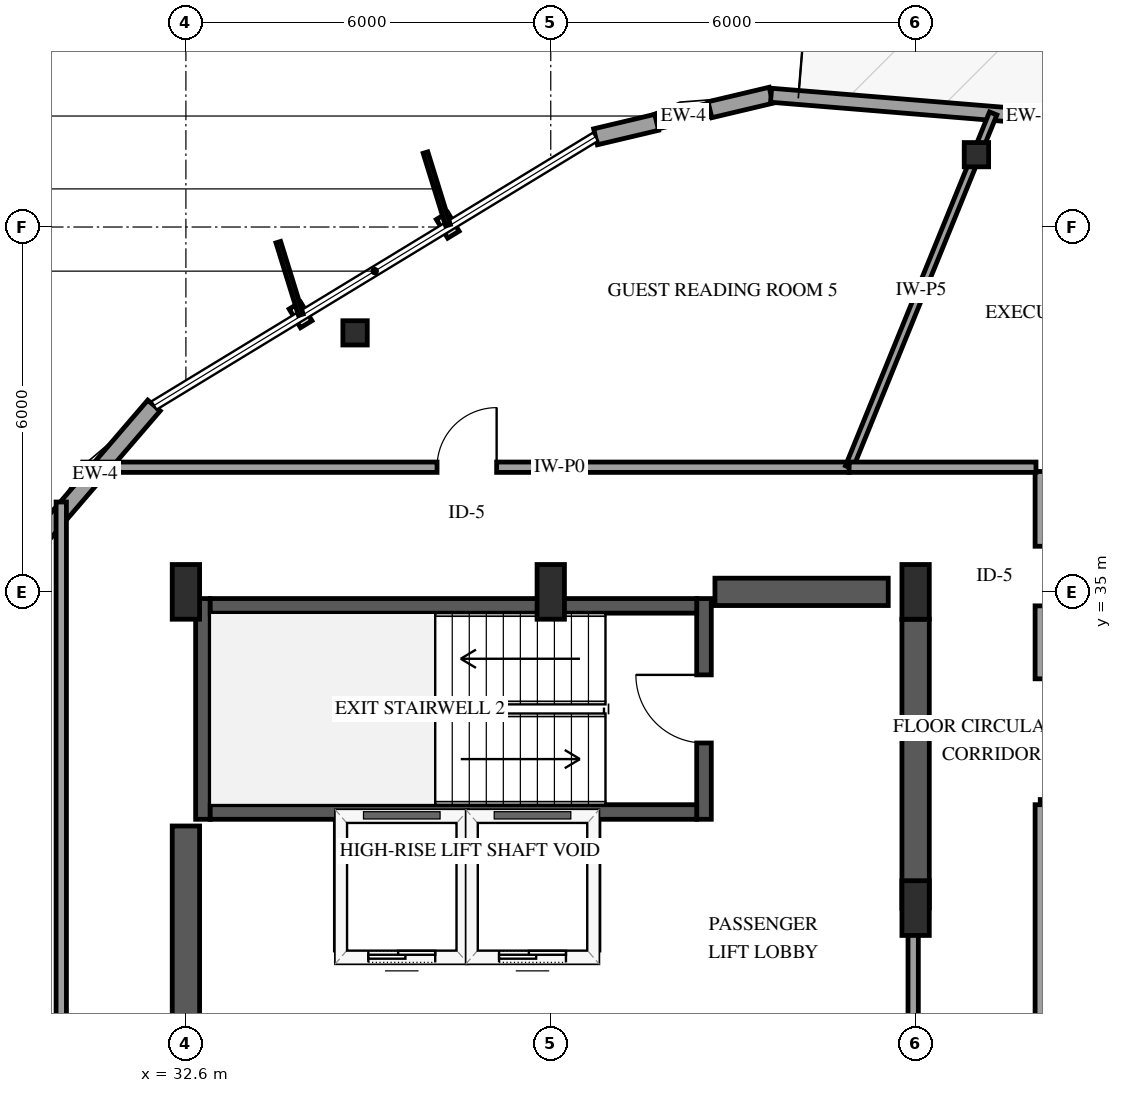
"""IFC4 building model, lengths in metres.
Left out: names, types, materials, properties, quantities, classifications, styles, units other than length and angle.
Written with IfcOpenShell. Run it as: python <this file> out.ifc"""

import sys

from ifc_helpers import new_model, si_unit, direction, frame, frame_2d, origin, origin_2d, place, context, subcontext, project, spatial, rectangle, i_section, extrude, element, fill, save


model = new_model("IFC4")
c1 = context("Model", 3, precision=1e-05, world=origin(), true_north=direction((0.0, 1.0)))
c2 = subcontext(c1, "Body", "Model", "MODEL_VIEW")
j1 = project(units=[si_unit("LENGTHUNIT", "METRE"), si_unit("PLANEANGLEUNIT", "RADIAN")], contexts=[c1])
p1 = place(None, origin())
s1 = spatial("IfcSite", under=j1, at=p1, CompositionType="ELEMENT")
p2 = place(p1, origin())
s2 = spatial("IfcBuilding", under=s1, at=p2, CompositionType="ELEMENT")
p3 = place(p2, frame((0.0, 0.0, 280.0)))
s3 = spatial("IfcBuildingStorey", under=s2, at=p3, CompositionType="ELEMENT", Elevation=280.0)
p4 = place(p3, frame((32.88, 31.26, 0.0), z_axis=(0.0, 0.0, 1.0), x_axis=(0.0, 1.0, 0.0)))
e1 = element("IfcWall", 1, at=p4, inside=s3, PredefinedType="SHEAR", context=c2, shape_type="SweptSolid", body=[
    extrude(rectangle(XDim=3.63, YDim=0.24, at=frame_2d((1.815, 0.0))), origin(), (0.0, 0.0, 1.0), 3.75),
])
p5 = place(p3, frame((41.12, 31.26, 0.0), z_axis=(0.0, 0.0, 1.0), x_axis=(0.0, 1.0, 0.0)))
e2 = element("IfcWall", 2, at=p5, inside=s3, PredefinedType="SHEAR", context=c2, shape_type="SweptSolid", body=[
    extrude(rectangle(XDim=3.63, YDim=0.24, at=frame_2d((1.815, 0.0))), origin(), (0.0, 0.0, 1.0), 3.75),
])
p6 = place(p5, frame((1.255, 0.0, 0.0)))
e3 = element("IfcOpeningElement", 3, at=p6, cuts=e2, PredefinedType="OPENING", context=c2, shape_type="SweptSolid", body=[
    extrude(rectangle(XDim=1.12, YDim=2.15, at=frame_2d((0.56, 1.075))), frame((0.0, 0.13, 0.0), z_axis=(0.0, -1.0, 0.0), x_axis=(1.0, 0.0, 0.0)), (0.0, 0.0, 1.0), 0.26),
])
for number, where, z_axis, x_axis in (
    (4, (33.0, 31.38, 0.0), (0.0, 0.0, 1.0), (1.0, 0.0, 0.0)),
    (5, (33.0, 34.77, 0.0), (0.0, 0.0, 1.0), (1.0, 0.0, 0.0)),
):
    element("IfcWall", number, at=place(p3, frame(where, z_axis=z_axis, x_axis=x_axis)), inside=s3, PredefinedType="SHEAR", context=c2, shape_type="SweptSolid", body=[
        extrude(rectangle(XDim=8.0, YDim=0.24, at=frame_2d((4.0, 0.0))), origin(), (0.0, 0.0, 1.0), 3.75),
    ])
p7 = place(p3, frame((32.6, 18.85, 0.0), z_axis=(0.0, 0.0, 1.0), x_axis=(0.0, 1.0, 0.0)))
e6 = element("IfcWall", 6, at=p7, inside=s3, PredefinedType="SHEAR", context=c2, shape_type="SweptSolid", body=[
    extrude(rectangle(XDim=12.3, YDim=0.45, at=frame_2d((6.15, 0.0))), origin(), (0.0, 0.0, 1.0), 3.75),
])
p8 = place(p3, frame((41.3, 35.0, 0.0), z_axis=(0.0, 0.0, 1.0), x_axis=(1.0, 0.0, 0.0)))
e7 = element("IfcWall", 7, at=p8, inside=s3, PredefinedType="SHEAR", context=c2, shape_type="SweptSolid", body=[
    extrude(rectangle(XDim=2.85, YDim=0.45, at=frame_2d((1.425, 0.0))), origin(), (0.0, 0.0, 1.0), 3.75),
])
p9 = place(p3, frame((44.6, 29.8, 0.0), z_axis=(0.0, 0.0, 1.0), x_axis=(0.0, 1.0, 0.0)))
e8 = element("IfcWall", 8, at=p9, inside=s3, PredefinedType="SHEAR", context=c2, shape_type="SweptSolid", body=[
    extrude(rectangle(XDim=4.75, YDim=0.45, at=frame_2d((2.375, 0.0))), origin(), (0.0, 0.0, 1.0), 3.75),
])
for number, where, z_axis, x_axis in (
    (9, (32.6, 35.0, 0.0), (0.0, 0.0, 1.0), (1.0, 0.0, 0.0)),
    (10, (38.6, 35.0, 0.0), (0.0, 0.0, 1.0), (1.0, 0.0, 0.0)),
    (11, (44.6, 29.8, 0.0), (0.0, 0.0, 1.0), (1.0, 0.0, 0.0)),
    (12, (44.6, 35.0, 0.0), (0.0, 0.0, 1.0), (1.0, 0.0, 0.0)),
):
    element("IfcColumn", number, at=place(p3, frame(where, z_axis=z_axis, x_axis=x_axis)), inside=s3, PredefinedType="PILASTER", context=c2, shape_type="SweptSolid", body=[
        extrude(rectangle(XDim=0.45, YDim=0.9, at=origin_2d()), origin(), (0.0, 0.0, 1.0), 3.75),
    ])
for number, where, z_axis, x_axis in (
    (13, (45.6, 42.189, 0.0), (0.0, 0.0, 1.0), (1.0, 0.0, 0.0)),
    (14, (35.382, 39.26, 0.0), (0.0, 0.0, 1.0), (1.0, 0.0, 0.0)),
):
    element("IfcColumn", number, at=place(p3, frame(where, z_axis=z_axis, x_axis=x_axis)), inside=s3, PredefinedType="COLUMN", context=c2, shape_type="SweptSolid", body=[
        extrude(i_section(OverallWidth=0.401, OverallDepth=0.399, WebThickness=0.025, FlangeThickness=0.04, FilletRadius=0.038, at=origin_2d()), origin(), (0.0, 0.0, 1.0), 3.75),
    ])
p10 = place(p3, frame((42.223, 43.167, 0.0), z_axis=(0.0, 0.0, 1.0), x_axis=(-0.973092427452, -0.230415120242, 0.0)))
e15 = element("IfcWall", 15, at=p10, inside=s3, PredefinedType="SOLIDWALL", context=c2, shape_type="SweptSolid", body=[
    extrude(rectangle(XDim=2.967, YDim=0.27, at=frame_2d((1.483, 0.0))), origin(), (0.0, 0.0, 1.0), 2.789),
])
p11 = place(p10, frame((1.033, 0.0, 0.75)))
e16 = element("IfcOpeningElement", 16, at=p11, cuts=e15, PredefinedType="OPENING", context=c2, shape_type="SweptSolid", body=[
    extrude(rectangle(XDim=0.9, YDim=1.5, at=frame_2d((0.45, 0.75))), frame((0.0, 0.145, 0.0), z_axis=(0.0, -1.0, 0.0), x_axis=(1.0, 0.0, 0.0)), (0.0, 0.0, 1.0), 0.29),
])
p12 = place(p3, frame((50.695, 42.473, 0.0), z_axis=(0.0, 0.0, 1.0), x_axis=(-0.996664954759, 0.081602499682, 0.0)))
e17 = element("IfcWall", 17, at=p12, inside=s3, PredefinedType="SOLIDWALL", context=c2, shape_type="SweptSolid", body=[
    extrude(rectangle(XDim=8.5, YDim=0.23, at=frame_2d((4.25, 0.0))), origin(), (0.0, 0.0, 1.0), 2.789),
])
p13 = place(p12, frame((0.65, 0.0, 0.0)))
e18 = element("IfcOpeningElement", 18, at=p13, cuts=e17, PredefinedType="OPENING", context=c2, shape_type="SweptSolid", body=[
    extrude(rectangle(XDim=1.0, YDim=2.15, at=frame_2d((0.5, 1.075))), frame((0.0, 0.125, 0.0), z_axis=(0.0, -1.0, 0.0), x_axis=(1.0, 0.0, 0.0)), (0.0, 0.0, 1.0), 0.25),
])
p14 = place(p12, frame((2.29, 0.0, 0.72)))
e19 = element("IfcOpeningElement", 19, at=p14, cuts=e17, PredefinedType="OPENING", context=c2, shape_type="SweptSolid", body=[
    extrude(rectangle(XDim=0.9, YDim=1.5, at=frame_2d((0.45, 0.75))), frame((0.0, 0.125, 0.0), z_axis=(0.0, -1.0, 0.0), x_axis=(1.0, 0.0, 0.0)), (0.0, 0.0, 1.0), 0.25),
])
p15 = place(p3, frame((32.075, 38.065, 0.0), z_axis=(0.0, 0.0, 1.0), x_axis=(-0.651854753915, -0.758343840087, 0.0)))
e20 = element("IfcWall", 20, at=p15, inside=s3, PredefinedType="SOLIDWALL", context=c2, shape_type="SweptSolid", body=[
    extrude(rectangle(XDim=2.967, YDim=0.27, at=frame_2d((1.483, 0.0))), origin(), (0.0, 0.0, 1.0), 2.789),
])
p16 = place(p3, frame((35.15, 29.0, 0.0), z_axis=(0.0, 0.0, 1.0), x_axis=(1.0, 0.0, 0.0)))
e21 = element("IfcWall", 21, at=p16, inside=s3, PredefinedType="SOLIDWALL", context=c2, shape_type="SweptSolid", body=[
    extrude(rectangle(XDim=2.0, YDim=0.185, at=frame_2d((1.0, 0.0))), origin(), (0.0, 0.0, 1.0), 3.41),
])
p17 = place(p16, frame((0.45, 0.0, 0.0)))
e22 = element("IfcOpeningElement", 22, at=p17, cuts=e21, PredefinedType="OPENING", context=c2, shape_type="SweptSolid", body=[
    extrude(rectangle(XDim=1.1, YDim=2.15, at=frame_2d((0.55, 1.075))), frame((0.0, 0.103, 0.0), z_axis=(0.0, -1.0, 0.0), x_axis=(1.0, 0.0, 0.0)), (0.0, 0.0, 1.0), 0.205),
])
for number, where, z_axis, x_axis in (
    (23, (35.15, 29.11, 0.0), (0.0, 0.0, 1.0), (0.0, 1.0, 0.0)),
    (24, (37.15, 29.11, 0.0), (0.0, 0.0, 1.0), (0.0, 1.0, 0.0)),
):
    element("IfcWall", number, at=place(p3, frame(where, z_axis=z_axis, x_axis=x_axis)), inside=s3, PredefinedType="SOLIDWALL", context=c2, shape_type="SweptSolid", body=[
        extrude(rectangle(XDim=2.1, YDim=0.185, at=frame_2d((1.05, 0.0))), origin(), (0.0, 0.0, 1.0), 3.41),
    ])
p18 = place(p3, frame((37.3, 29.0, 0.0), z_axis=(0.0, 0.0, 1.0), x_axis=(1.0, 0.0, 0.0)))
e25 = element("IfcWall", 25, at=p18, inside=s3, PredefinedType="SOLIDWALL", context=c2, shape_type="SweptSolid", body=[
    extrude(rectangle(XDim=2.0, YDim=0.185, at=frame_2d((1.0, 0.0))), origin(), (0.0, 0.0, 1.0), 3.41),
])
p19 = place(p18, frame((0.45, 0.0, 0.0)))
e26 = element("IfcOpeningElement", 26, at=p19, cuts=e25, PredefinedType="OPENING", context=c2, shape_type="SweptSolid", body=[
    extrude(rectangle(XDim=1.1, YDim=2.15, at=frame_2d((0.55, 1.075))), frame((0.0, 0.103, 0.0), z_axis=(0.0, -1.0, 0.0), x_axis=(1.0, 0.0, 0.0)), (0.0, 0.0, 1.0), 0.205),
])
p20 = place(p3, frame((39.3, 29.11, 0.0), z_axis=(0.0, 0.0, 1.0), x_axis=(0.0, 1.0, 0.0)))
e27 = element("IfcWall", 27, at=p20, inside=s3, PredefinedType="SOLIDWALL", context=c2, shape_type="SweptSolid", body=[
    extrude(rectangle(XDim=2.1, YDim=0.185, at=frame_2d((1.05, 0.0))), origin(), (0.0, 0.0, 1.0), 3.41),
])
p21 = place(p3, frame((30.55, 13.843, 0.0), z_axis=(0.0, 0.0, 1.0), x_axis=(0.0, 1.0, 0.0)))
e28 = element("IfcWall", 28, at=p21, inside=s3, PredefinedType="PARTITIONING", context=c2, shape_type="SweptSolid", body=[
    extrude(rectangle(XDim=22.635, YDim=0.17, at=frame_2d((11.317, 0.0))), origin(), (0.0, 0.0, 1.0), 3.41),
])
p22 = place(p21, frame((10.843, 0.0, 0.0)))
e29 = element("IfcOpeningElement", 29, at=p22, cuts=e28, PredefinedType="OPENING", context=c2, shape_type="SweptSolid", body=[
    extrude(rectangle(XDim=0.98, YDim=2.15, at=frame_2d((0.49, 1.075))), frame((0.0, 0.095, 0.0), z_axis=(0.0, -1.0, 0.0), x_axis=(1.0, 0.0, 0.0)), (0.0, 0.0, 1.0), 0.19),
])
p23 = place(p3, frame((46.65, 26.665, 0.0), z_axis=(0.0, 0.0, 1.0), x_axis=(0.97930966803, 0.202367423521, 0.0)))
e30 = element("IfcWall", 30, at=p23, inside=s3, PredefinedType="PARTITIONING", context=c2, shape_type="SweptSolid", body=[
    extrude(rectangle(XDim=15.897, YDim=0.13, at=frame_2d((7.948, 0.0))), origin(), (0.0, 0.0, 1.0), 2.705),
])
p24 = place(p3, frame((61.835, 31.5, 0.0), z_axis=(0.0, 0.0, 1.0), x_axis=(-1.0, 0.0, 0.0)))
e31 = element("IfcWall", 31, at=p24, inside=s3, PredefinedType="PARTITIONING", context=c2, shape_type="SweptSolid", body=[
    extrude(rectangle(XDim=15.185, YDim=0.17, at=frame_2d((7.593, 0.0))), origin(), (0.0, 0.0, 1.0), 3.41),
])
p25 = place(p24, frame((7.118, 0.0, 0.0)))
e32 = element("IfcOpeningElement", 32, at=p25, cuts=e31, PredefinedType="OPENING", context=c2, shape_type="SweptSolid", body=[
    extrude(rectangle(XDim=0.98, YDim=2.15, at=frame_2d((0.49, 1.075))), frame((0.0, 0.095, 0.0), z_axis=(0.0, -1.0, 0.0), x_axis=(1.0, 0.0, 0.0)), (0.0, 0.0, 1.0), 0.19),
])
p26 = place(p3, frame((30.903, 37.05, 0.0), z_axis=(0.0, 0.0, 1.0), x_axis=(1.0, 0.0, 0.0)))
e33 = element("IfcWall", 33, at=p26, inside=s3, PredefinedType="PARTITIONING", context=c2, shape_type="SweptSolid", body=[
    extrude(rectangle(XDim=12.604, YDim=0.17, at=frame_2d((6.302, 0.0))), origin(), (0.0, 0.0, 1.0), 3.41),
])
p27 = place(p26, frame((5.827, 0.0, 0.0)))
e34 = element("IfcOpeningElement", 34, at=p27, cuts=e33, PredefinedType="OPENING", context=c2, shape_type="SweptSolid", body=[
    extrude(rectangle(XDim=0.98, YDim=2.15, at=frame_2d((0.49, 1.075))), frame((0.0, 0.095, 0.0), z_axis=(0.0, -1.0, 0.0), x_axis=(1.0, 0.0, 0.0)), (0.0, 0.0, 1.0), 0.19),
])
p28 = place(p3, frame((44.56, 29.8, 0.0), z_axis=(0.0, 0.0, 1.0), x_axis=(0.0, -1.0, 0.0)))
e35 = element("IfcWall", 35, at=p28, inside=s3, PredefinedType="PARTITIONING", context=c2, shape_type="SweptSolid", body=[
    extrude(rectangle(XDim=6.91, YDim=0.17, at=frame_2d((3.455, 0.0))), origin(), (0.0, 0.0, 1.0), 2.45),
])
p29 = place(p28, frame((2.915, 0.0, 0.0)))
e36 = element("IfcOpeningElement", 36, at=p29, cuts=e35, PredefinedType="OPENING", context=c2, shape_type="SweptSolid", body=[
    extrude(rectangle(XDim=1.08, YDim=2.15, at=frame_2d((0.54, 1.075))), frame((0.0, 0.095, 0.0), z_axis=(0.0, -1.0, 0.0), x_axis=(1.0, 0.0, 0.0)), (0.0, 0.0, 1.0), 0.19),
])
p30 = place(p3, frame((43.507, 37.05, 0.0), z_axis=(0.0, 0.0, 1.0), x_axis=(0.377112931265, 0.926167283525, 0.0)))
e37 = element("IfcWall", 37, at=p30, inside=s3, PredefinedType="PARTITIONING", context=c2, shape_type="SweptSolid", body=[
    extrude(rectangle(XDim=6.282, YDim=0.13, at=frame_2d((3.141, 0.0))), origin(), (0.0, 0.0, 1.0), 2.705),
])
p31 = place(p3, frame((46.65, 31.5, 0.0), z_axis=(0.0, 0.0, 1.0), x_axis=(0.0, -1.0, 0.0)))
e38 = element("IfcWall", 38, at=p31, inside=s3, PredefinedType="PARTITIONING", context=c2, shape_type="SweptSolid", body=[
    extrude(rectangle(XDim=4.835, YDim=0.17, at=frame_2d((2.417, 0.0))), origin(), (0.0, 0.0, 1.0), 3.41),
])
p32 = place(p3, frame((46.65, 36.98, 0.0), z_axis=(0.0, 0.0, 1.0), x_axis=(0.0, -1.0, 0.0)))
e39 = element("IfcWall", 39, at=p32, inside=s3, PredefinedType="PARTITIONING", context=c2, shape_type="SweptSolid", body=[
    extrude(rectangle(XDim=3.41, YDim=0.17, at=frame_2d((1.705, 0.0))), origin(), (0.0, 0.0, 1.0), 3.41),
])
p33 = place(p32, frame((1.23, 0.0, 0.0)))
e40 = element("IfcOpeningElement", 40, at=p33, cuts=e39, PredefinedType="OPENING", context=c2, shape_type="SweptSolid", body=[
    extrude(rectangle(XDim=0.98, YDim=2.15, at=frame_2d((0.49, 1.075))), frame((0.0, 0.095, 0.0), z_axis=(0.0, -1.0, 0.0), x_axis=(1.0, 0.0, 0.0)), (0.0, 0.0, 1.0), 0.19),
])
p34 = place(p3, frame((43.507, 37.05, 0.0), z_axis=(0.0, 0.0, 1.0), x_axis=(1.0, 0.0, 0.0)))
e41 = element("IfcWall", 41, at=p34, inside=s3, PredefinedType="PARTITIONING", context=c2, shape_type="SweptSolid", body=[
    extrude(rectangle(XDim=3.073, YDim=0.17, at=frame_2d((1.537, 0.0))), origin(), (0.0, 0.0, 1.0), 3.41),
])
p35 = place(p11, origin())
e42 = element("IfcWindow", 42, at=p35, inside=s3, PartitioningType="SINGLE_PANEL", PredefinedType="WINDOW", context=c2, shape_type="SweptSolid", body=[
    extrude(rectangle(XDim=0.9, YDim=1.5, at=frame_2d((0.45, 0.75))), frame((0.0, 0.03, 0.0), z_axis=(0.0, -1.0, 0.0), x_axis=(1.0, 0.0, 0.0)), (0.0, 0.0, 1.0), 0.06),
])
fill(e16, e42)
p36 = place(p17, origin())
e43 = element("IfcDoor", 43, at=p36, inside=s3, OperationType="SLIDING_TO_LEFT", PredefinedType="DOOR", context=c2, shape_type="SweptSolid", body=[
    extrude(rectangle(XDim=1.1, YDim=2.15, at=frame_2d((0.55, 1.075))), frame((0.0, 0.025, 0.0), z_axis=(0.0, -1.0, 0.0), x_axis=(1.0, 0.0, 0.0)), (0.0, 0.0, 1.0), 0.05),
])
fill(e22, e43)
p37 = place(p19, origin())
e44 = element("IfcDoor", 44, at=p37, inside=s3, OperationType="SLIDING_TO_LEFT", PredefinedType="DOOR", context=c2, shape_type="SweptSolid", body=[
    extrude(rectangle(XDim=1.1, YDim=2.15, at=frame_2d((0.55, 1.075))), frame((0.0, 0.025, 0.0), z_axis=(0.0, -1.0, 0.0), x_axis=(1.0, 0.0, 0.0)), (0.0, 0.0, 1.0), 0.05),
])
fill(e26, e44)
p38 = place(p6, origin())
e45 = element("IfcDoor", 45, at=p38, inside=s3, OperationType="SINGLE_SWING_RIGHT", PredefinedType="DOOR", context=c2, shape_type="SweptSolid", body=[
    extrude(rectangle(XDim=1.12, YDim=2.15, at=frame_2d((0.56, 1.075))), frame((0.0, 0.025, 0.0), z_axis=(0.0, -1.0, 0.0), x_axis=(1.0, 0.0, 0.0)), (0.0, 0.0, 1.0), 0.05),
])
fill(e3, e45)
p39 = place(p27, origin())
e46 = element("IfcDoor", 46, at=p39, inside=s3, OperationType="SINGLE_SWING_RIGHT", PredefinedType="DOOR", context=c2, shape_type="SweptSolid", body=[
    extrude(rectangle(XDim=0.98, YDim=2.15, at=frame_2d((0.49, 1.075))), frame((0.0, 0.025, 0.0), z_axis=(0.0, -1.0, 0.0), x_axis=(1.0, 0.0, 0.0)), (0.0, 0.0, 1.0), 0.05),
])
fill(e34, e46)
p40 = place(p33, origin())
e47 = element("IfcDoor", 47, at=p40, inside=s3, OperationType="SINGLE_SWING_RIGHT", PredefinedType="DOOR", context=c2, shape_type="SweptSolid", body=[
    extrude(rectangle(XDim=0.98, YDim=2.15, at=frame_2d((0.49, 1.075))), frame((0.0, 0.025, 0.0), z_axis=(0.0, -1.0, 0.0), x_axis=(1.0, 0.0, 0.0)), (0.0, 0.0, 1.0), 0.05),
])
fill(e40, e47)
save(model, sys.argv[1])
